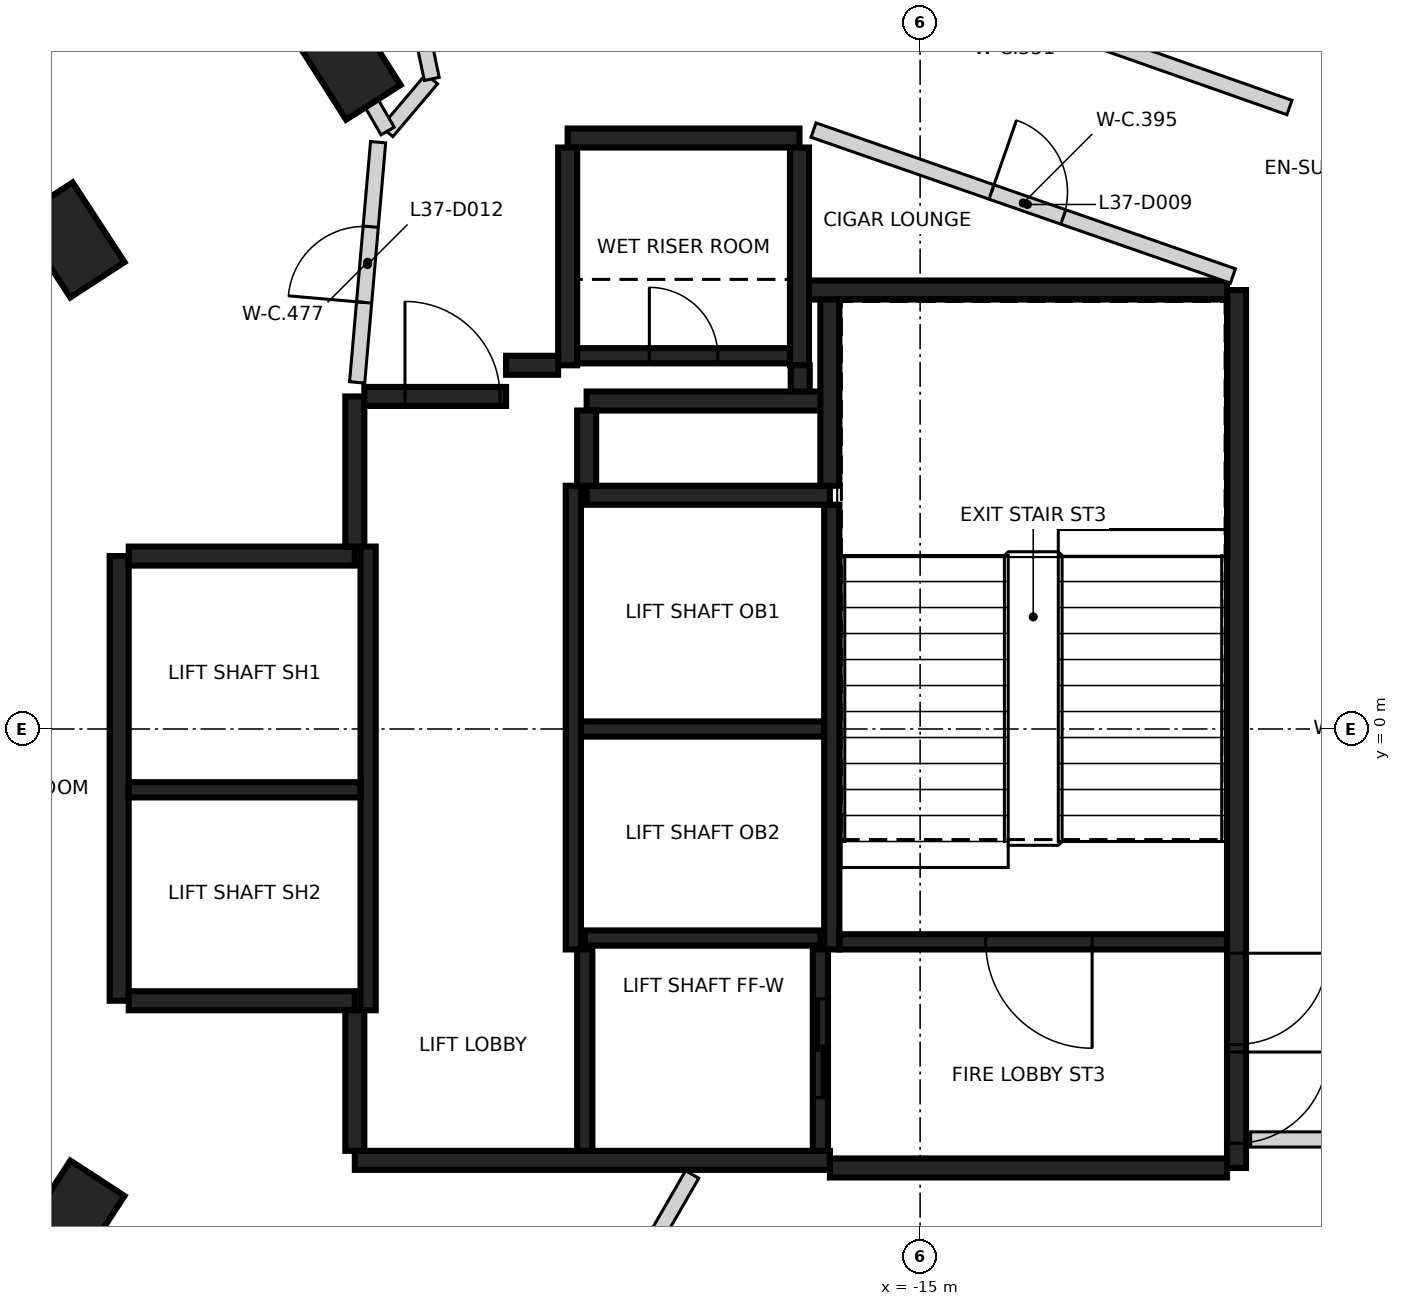
"""IFC4 building model, lengths in metres.
Left out: names, types, materials, properties, quantities, classifications, styles, units other than length and angle.
Written with IfcOpenShell. Run it as: python <this file> out.ifc"""

import sys

from ifc_helpers import new_model, si_unit, direction, frame, frame_2d, origin, origin_2d, place, context, subcontext, project, spatial, rectangle, extrude, element, fill, save


model = new_model("IFC4")
c1 = context("Model", 3, precision=1e-05, world=origin(), true_north=direction((0.0, 1.0)))
c2 = subcontext(c1, "Body", "Model", "MODEL_VIEW")
j1 = project(units=[si_unit("LENGTHUNIT", "METRE"), si_unit("PLANEANGLEUNIT", "RADIAN")], contexts=[c1])
p1 = place(None, origin())
s1 = spatial("IfcSite", under=j1, at=p1, CompositionType="ELEMENT")
p2 = place(p1, origin())
s2 = spatial("IfcBuilding", under=s1, at=p2, CompositionType="ELEMENT")
p3 = place(p2, frame((0.0, 0.0, 150.4)))
s3 = spatial("IfcBuildingStorey", under=s2, at=p3, CompositionType="ELEMENT", Elevation=150.4)
for number, where, z_axis, x_axis in (
    (1, (-22.529, 8.772, -0.4), (0.0, 0.0, 1.0), (-0.536, 0.844, 0.0)),
    (2, (-26.165, 6.434, -0.4), (0.0, 0.0, 1.0), (-0.546, 0.838, 0.0)),
    (3, (-26.165, -6.434, -0.4), (0.0, 0.0, 1.0), (0.546, 0.838, 0.0)),
):
    element("IfcColumn", number, at=place(p3, frame(where, z_axis=z_axis, x_axis=x_axis)), inside=s3, PredefinedType="COLUMN", context=c2, shape_type="SweptSolid", body=[
        extrude(rectangle(XDim=1.25, YDim=0.85, at=origin_2d()), origin(), (0.0, 0.0, 1.0), 3.6),
    ])
p4 = place(p3, frame((-10.837, 5.775, 0.0), z_axis=(0.0, 0.0, 1.0), x_axis=(0.0, -1.0, 0.0)))
e4 = element("IfcWall", 4, at=p4, inside=s3, PredefinedType="SHEAR", context=c2, shape_type="SweptSolid", body=[
    extrude(rectangle(XDim=11.55, YDim=0.25, at=frame_2d((5.775, 0.0))), origin(), (0.0, 0.0, 1.0), 3.2),
])
p5 = place(p4, frame((10.025, 0.0, 0.0)))
e5 = element("IfcOpeningElement", 5, at=p5, cuts=e4, PredefinedType="OPENING", context=c2, shape_type="SweptSolid", body=[
    extrude(rectangle(XDim=1.2, YDim=2.1, at=frame_2d((0.6, 1.05))), frame((0.0, 0.135, 0.0), z_axis=(0.0, -1.0, 0.0), x_axis=(1.0, 0.0, 0.0)), (0.0, 0.0, 1.0), 0.27),
])
p6 = place(p4, frame((8.725, 0.0, 0.0)))
e6 = element("IfcOpeningElement", 6, at=p6, cuts=e4, PredefinedType="OPENING", context=c2, shape_type="SweptSolid", body=[
    extrude(rectangle(XDim=1.2, YDim=2.1, at=frame_2d((0.6, 1.05))), frame((0.0, 0.135, 0.0), z_axis=(0.0, -1.0, 0.0), x_axis=(1.0, 0.0, 0.0)), (0.0, 0.0, 1.0), 0.27),
])
p7 = place(p3, frame((-16.187, -5.675, 0.0), z_axis=(0.0, 0.0, 1.0), x_axis=(-1.0, 0.0, 0.0)))
e7 = element("IfcWall", 7, at=p7, inside=s3, PredefinedType="SHEAR", context=c2, shape_type="SweptSolid", body=[
    extrude(rectangle(XDim=6.25, YDim=0.25, at=frame_2d((3.125, 0.0))), origin(), (0.0, 0.0, 1.0), 3.2),
])
p8 = place(p3, frame((-25.537, -3.575, 0.0), z_axis=(0.0, 0.0, 1.0), x_axis=(0.0, 1.0, 0.0)))
e8 = element("IfcWall", 8, at=p8, inside=s3, PredefinedType="SHEAR", context=c2, shape_type="SweptSolid", body=[
    extrude(rectangle(XDim=5.85, YDim=0.25, at=frame_2d((2.925, 0.0))), origin(), (0.0, 0.0, 1.0), 3.2),
])
p9 = place(p3, frame((-10.963, -5.775, 0.0), z_axis=(0.0, 0.0, 1.0), x_axis=(-1.0, 0.0, 0.0)))
e9 = element("IfcWall", 9, at=p9, inside=s3, PredefinedType="SHEAR", context=c2, shape_type="SweptSolid", body=[
    extrude(rectangle(XDim=5.225, YDim=0.25, at=frame_2d((2.612, 0.0))), origin(), (0.0, 0.0, 1.0), 3.2),
])
p10 = place(p3, frame((-16.472, 5.775, 0.0), z_axis=(0.0, 0.0, 1.0), x_axis=(1.0, 0.0, 0.0)))
e10 = element("IfcWall", 10, at=p10, inside=s3, PredefinedType="SHEAR", context=c2, shape_type="SweptSolid", body=[
    extrude(rectangle(XDim=5.51, YDim=0.25, at=frame_2d((2.755, 0.0))), origin(), (0.0, 0.0, 1.0), 3.2),
])
p11 = place(p3, frame((-19.387, 3.075, 0.0), z_axis=(0.0, 0.0, 1.0), x_axis=(1.0, 0.0, 0.0)))
e11 = element("IfcWall", 11, at=p11, inside=s3, PredefinedType="SHEAR", context=c2, shape_type="SweptSolid", body=[
    extrude(rectangle(XDim=3.2, YDim=0.25, at=frame_2d((1.6, 0.0))), origin(), (0.0, 0.0, 1.0), 3.2),
])
for number, where, z_axis, x_axis in (
    (12, (-22.437, -3.575, 0.0), (0.0, 0.0, 1.0), (-1.0, 0.0, 0.0)),
    (13, (-25.412, 2.275, 0.0), (0.0, 0.0, 1.0), (1.0, 0.0, 0.0)),
):
    element("IfcWall", number, at=place(p3, frame(where, z_axis=z_axis, x_axis=x_axis)), inside=s3, PredefinedType="SHEAR", context=c2, shape_type="SweptSolid", body=[
        extrude(rectangle(XDim=2.975, YDim=0.25, at=frame_2d((1.487, 0.0))), origin(), (0.0, 0.0, 1.0), 3.2),
    ])
p12 = place(p3, frame((-19.637, 7.775, 0.0), z_axis=(0.0, 0.0, 1.0), x_axis=(1.0, 0.0, 0.0)))
e14 = element("IfcWall", 14, at=p12, inside=s3, PredefinedType="SHEAR", context=c2, shape_type="SweptSolid", body=[
    extrude(rectangle(XDim=3.05, YDim=0.25, at=frame_2d((1.525, 0.0))), origin(), (0.0, 0.0, 1.0), 3.2),
])
for number, where, z_axis, x_axis in (
    (15, (-16.587, 7.65, 0.0), (0.0, 0.0, 1.0), (0.0, -1.0, 0.0)),
    (16, (-19.637, 4.785, 0.0), (0.0, 0.0, 1.0), (0.0, 1.0, 0.0)),
):
    element("IfcWall", number, at=place(p3, frame(where, z_axis=z_axis, x_axis=x_axis)), inside=s3, PredefinedType="SHEAR", context=c2, shape_type="SweptSolid", body=[
        extrude(rectangle(XDim=2.865, YDim=0.25, at=frame_2d((1.432, 0.0))), origin(), (0.0, 0.0, 1.0), 3.2),
    ])
p13 = place(p3, frame((-16.302, 4.315, 0.0), z_axis=(0.0, 0.0, 1.0), x_axis=(-1.0, 0.0, 0.0)))
e17 = element("IfcWall", 17, at=p13, inside=s3, PredefinedType="SHEAR", context=c2, shape_type="SweptSolid", body=[
    extrude(rectangle(XDim=3.085, YDim=0.25, at=frame_2d((1.542, 0.0))), origin(), (0.0, 0.0, 1.0), 3.2),
])
p14 = place(p3, frame((-16.187, 3.2, 0.0), z_axis=(0.0, 0.0, 1.0), x_axis=(0.0, 1.0, 0.0)))
e18 = element("IfcWall", 18, at=p14, inside=s3, PredefinedType="SHEAR", context=c2, shape_type="SweptSolid", body=[
    extrude(rectangle(XDim=2.449, YDim=0.25, at=frame_2d((1.225, 0.0))), origin(), (0.0, 0.0, 1.0), 3.2),
])
p15 = place(p3, frame((-22.437, 2.4, 0.0), z_axis=(0.0, 0.0, 1.0), x_axis=(0.0, 1.0, 0.0)))
e19 = element("IfcWall", 19, at=p15, inside=s3, PredefinedType="SHEAR", context=c2, shape_type="SweptSolid", body=[
    extrude(rectangle(XDim=1.975, YDim=0.25, at=frame_2d((0.987, 0.0))), origin(), (0.0, 0.0, 1.0), 3.2),
])
p16 = place(p3, frame((-22.437, -5.55, 0.0), z_axis=(0.0, 0.0, 1.0), x_axis=(0.0, 1.0, 0.0)))
e20 = element("IfcWall", 20, at=p16, inside=s3, PredefinedType="SHEAR", context=c2, shape_type="SweptSolid", body=[
    extrude(rectangle(XDim=1.849, YDim=0.25, at=frame_2d((0.925, 0.0))), origin(), (0.0, 0.0, 1.0), 3.2),
])
p17 = place(p3, frame((-22.312, 4.375, 0.0), z_axis=(0.0, 0.0, 1.0), x_axis=(1.0, 0.0, 0.0)))
e21 = element("IfcWall", 21, at=p17, inside=s3, PredefinedType="SHEAR", context=c2, shape_type="SweptSolid", body=[
    extrude(rectangle(XDim=1.865, YDim=0.25, at=frame_2d((0.932, 0.0))), origin(), (0.0, 0.0, 1.0), 3.2),
])
p18 = place(p17, frame((0.535, 0.0, 0.0)))
e22 = element("IfcOpeningElement", 22, at=p18, cuts=e21, PredefinedType="OPENING", context=c2, shape_type="SweptSolid", body=[
    extrude(rectangle(XDim=1.25, YDim=2.1, at=frame_2d((0.625, 1.05))), frame((0.0, 0.135, 0.0), z_axis=(0.0, -1.0, 0.0), x_axis=(1.0, 0.0, 0.0)), (0.0, 0.0, 1.0), 0.27),
])
p19 = place(p3, frame((-19.387, 4.19, 0.0), z_axis=(0.0, 0.0, 1.0), x_axis=(0.0, -1.0, 0.0)))
e23 = element("IfcWall", 23, at=p19, inside=s3, PredefinedType="SHEAR", context=c2, shape_type="SweptSolid", body=[
    extrude(rectangle(XDim=0.989, YDim=0.25, at=frame_2d((0.495, 0.0))), origin(), (0.0, 0.0, 1.0), 3.2),
])
p20 = place(p3, frame((-20.447, 4.785, 0.0), z_axis=(0.0, 0.0, 1.0), x_axis=(1.0, 0.0, 0.0)))
e24 = element("IfcWall", 24, at=p20, inside=s3, PredefinedType="SHEAR", context=c2, shape_type="SweptSolid", body=[
    extrude(rectangle(XDim=0.685, YDim=0.25, at=frame_2d((0.342, 0.0))), origin(), (0.0, 0.0, 1.0), 3.2),
])
p21 = place(p3, frame((-16.577, 4.785, 0.0), z_axis=(0.0, 0.0, 1.0), x_axis=(0.0, -1.0, 0.0)))
e25 = element("IfcWall", 25, at=p21, inside=s3, PredefinedType="SHEAR", context=c2, shape_type="SweptSolid", body=[
    extrude(rectangle(XDim=0.344, YDim=0.25, at=frame_2d((0.172, 0.0))), origin(), (0.0, 0.0, 1.0), 3.2),
])
p22 = place(p3, frame((-16.162, 2.951, 0.0), z_axis=(0.0, 0.0, 1.0), x_axis=(0.0, -1.0, 0.0)))
e26 = element("IfcWall", 26, at=p22, inside=s3, PredefinedType="SHEAR", context=c2, shape_type="SweptSolid", body=[
    extrude(rectangle(XDim=5.851, YDim=0.2, at=frame_2d((2.925, 0.0))), origin(), (0.0, 0.0, 1.0), 3.2),
])
for number, where, z_axis, x_axis in (
    (27, (-19.562, -2.9, 0.0), (0.0, 0.0, 1.0), (0.0, 1.0, 0.0)),
    (28, (-22.262, 2.4, 0.0), (0.0, 0.0, 1.0), (0.0, -1.0, 0.0)),
):
    element("IfcWall", number, at=place(p3, frame(where, z_axis=z_axis, x_axis=x_axis)), inside=s3, PredefinedType="SHEAR", context=c2, shape_type="SweptSolid", body=[
        extrude(rectangle(XDim=6.1, YDim=0.2, at=frame_2d((3.05, 0.0))), origin(), (0.0, 0.0, 1.0), 3.2),
    ])
p23 = place(p3, frame((-10.963, -2.8, 0.0), z_axis=(0.0, 0.0, 1.0), x_axis=(-1.0, 0.0, 0.0)))
e29 = element("IfcWall", 29, at=p23, inside=s3, PredefinedType="SHEAR", context=c2, shape_type="SweptSolid", body=[
    extrude(rectangle(XDim=5.098, YDim=0.2, at=frame_2d((2.549, 0.0))), origin(), (0.0, 0.0, 1.0), 3.2),
])
p24 = place(p23, frame((1.774, 0.0, 0.0)))
e30 = element("IfcOpeningElement", 30, at=p24, cuts=e29, PredefinedType="OPENING", context=c2, shape_type="SweptSolid", body=[
    extrude(rectangle(XDim=1.4, YDim=2.1, at=frame_2d((0.7, 1.05))), frame((0.0, 0.11, 0.0), z_axis=(0.0, -1.0, 0.0), x_axis=(1.0, 0.0, 0.0)), (0.0, 0.0, 1.0), 0.22),
])
p25 = place(p3, frame((-16.263, 0.0, 0.0), z_axis=(0.0, 0.0, 1.0), x_axis=(-1.0, 0.0, 0.0)))
e31 = element("IfcWall", 31, at=p25, inside=s3, PredefinedType="SHEAR", context=c2, shape_type="SweptSolid", body=[
    extrude(rectangle(XDim=3.198, YDim=0.2, at=frame_2d((1.599, 0.0))), origin(), (0.0, 0.0, 1.0), 3.2),
])
p26 = place(p3, frame((-22.363, -0.8, 0.0), z_axis=(0.0, 0.0, 1.0), x_axis=(-1.0, 0.0, 0.0)))
e32 = element("IfcWall", 32, at=p26, inside=s3, PredefinedType="SHEAR", context=c2, shape_type="SweptSolid", body=[
    extrude(rectangle(XDim=3.048, YDim=0.2, at=frame_2d((1.524, 0.0))), origin(), (0.0, 0.0, 1.0), 3.2),
])
p27 = place(p3, frame((-19.511, 4.91, 0.0), z_axis=(0.0, 0.0, 1.0), x_axis=(1.0, 0.0, 0.0)))
e33 = element("IfcWall", 33, at=p27, inside=s3, PredefinedType="SHEAR", context=c2, shape_type="SweptSolid", body=[
    extrude(rectangle(XDim=2.798, YDim=0.2, at=frame_2d((1.399, 0.0))), origin(), (0.0, 0.0, 1.0), 3.2),
])
p28 = place(p27, frame((0.949, 0.0, 0.0)))
e34 = element("IfcOpeningElement", 34, at=p28, cuts=e33, PredefinedType="OPENING", context=c2, shape_type="SweptSolid", body=[
    extrude(rectangle(XDim=0.9, YDim=2.1, at=frame_2d((0.45, 1.05))), frame((0.0, 0.11, 0.0), z_axis=(0.0, -1.0, 0.0), x_axis=(1.0, 0.0, 0.0)), (0.0, 0.0, 1.0), 0.22),
])
p29 = place(p3, frame((-19.412, -2.75, 0.0), z_axis=(0.0, 0.0, 1.0), x_axis=(1.0, 0.0, 0.0)))
e35 = element("IfcWall", 35, at=p29, inside=s3, PredefinedType="SHEAR", context=c2, shape_type="SweptSolid", body=[
    extrude(rectangle(XDim=3.1, YDim=0.2, at=frame_2d((1.55, 0.0))), origin(), (0.0, 0.0, 1.0), 3.2),
])
p30 = place(p3, frame((-16.312, -2.898, 0.0), z_axis=(0.0, 0.0, 1.0), x_axis=(0.0, -1.0, 0.0)))
e36 = element("IfcWall", 36, at=p30, inside=s3, PredefinedType="SHEAR", context=c2, shape_type="SweptSolid", body=[
    extrude(rectangle(XDim=2.651, YDim=0.2, at=frame_2d((1.325, 0.0))), origin(), (0.0, 0.0, 1.0), 3.2),
])
p31 = place(p30, frame((0.652, 0.0, 0.0)))
e37 = element("IfcOpeningElement", 37, at=p31, cuts=e36, PredefinedType="OPENING", context=c2, shape_type="SweptSolid", body=[
    extrude(rectangle(XDim=1.3, YDim=2.1, at=frame_2d((0.65, 1.05))), frame((0.0, 0.11, 0.0), z_axis=(0.0, -1.0, 0.0), x_axis=(1.0, 0.0, 0.0)), (0.0, 0.0, 1.0), 0.22),
])
p32 = place(p3, frame((-19.412, -5.549, 0.0), z_axis=(0.0, 0.0, 1.0), x_axis=(0.0, 1.0, 0.0)))
e38 = element("IfcWall", 38, at=p32, inside=s3, PredefinedType="SHEAR", context=c2, shape_type="SweptSolid", body=[
    extrude(rectangle(XDim=2.651, YDim=0.2, at=frame_2d((1.325, 0.0))), origin(), (0.0, 0.0, 1.0), 3.2),
])
p33 = place(p3, frame((-22.407, 4.56, 0.0), z_axis=(0.0, 0.0, 1.0), x_axis=(0.086898645684, 0.996217157741, 0.0)))
e39 = element("IfcWall", 39, at=p33, inside=s3, PredefinedType="PARTITIONING", context=c2, shape_type="SweptSolid", body=[
    extrude(rectangle(XDim=3.172, YDim=0.2, at=frame_2d((1.586, 0.0))), origin(), (0.0, 0.0, 1.0), 3.2),
])
p34 = place(p33, frame((1.056, 0.0, 0.0)))
e40 = element("IfcOpeningElement", 40, at=p34, cuts=e39, PredefinedType="OPENING", context=c2, shape_type="SweptSolid", body=[
    extrude(rectangle(XDim=1.0, YDim=2.1, at=frame_2d((0.5, 1.05))), frame((0.0, 0.11, 0.0), z_axis=(0.0, -1.0, 0.0), x_axis=(1.0, 0.0, 0.0)), (0.0, 0.0, 1.0), 0.22),
])
p35 = place(p3, frame((-22.013, 7.858, 0.0), z_axis=(0.0, 0.0, 1.0), x_axis=(0.646315152402, 0.763070588986, 0.0)))
e41 = element("IfcWall", 41, at=p35, inside=s3, PredefinedType="PARTITIONING", context=c2, shape_type="SweptSolid", body=[
    extrude(rectangle(XDim=0.91, YDim=0.2, at=frame_2d((0.455, 0.0))), origin(), (0.0, 0.0, 1.0), 3.2),
])
p36 = place(p3, frame((-21.605, 9.412, 0.0), z_axis=(0.0, 0.0, 1.0), x_axis=(0.204764111512, -0.978811349871, 0.0)))
e42 = element("IfcWall", 42, at=p36, inside=s3, PredefinedType="PARTITIONING", context=c2, shape_type="SweptSolid", body=[
    extrude(rectangle(XDim=0.879, YDim=0.2, at=frame_2d((0.439, 0.0))), origin(), (0.0, 0.0, 1.0), 2.3),
])
p37 = place(p3, frame((-16.402, 7.879, 0.0), z_axis=(0.0, 0.0, 1.0), x_axis=(0.94449961557, -0.328512520596, 0.0)))
e43 = element("IfcWall", 43, at=p37, inside=s3, PredefinedType="PARTITIONING", context=c2, shape_type="SweptSolid", body=[
    extrude(rectangle(XDim=5.842, YDim=0.2, at=frame_2d((2.921, 0.0))), origin(), (0.0, 0.0, 1.0), 3.2),
])
p38 = place(p37, frame((2.479, 0.0, 0.0)))
e44 = element("IfcOpeningElement", 44, at=p38, cuts=e43, PredefinedType="OPENING", context=c2, shape_type="SweptSolid", body=[
    extrude(rectangle(XDim=1.0, YDim=2.1, at=frame_2d((0.5, 1.05))), frame((0.0, 0.11, 0.0), z_axis=(0.0, -1.0, 0.0), x_axis=(1.0, 0.0, 0.0)), (0.0, 0.0, 1.0), 0.22),
])
p39 = place(p3, frame((-16.026, 10.246, 0.0), z_axis=(0.0, 0.0, 1.0), x_axis=(0.943337348352, -0.331835271187, 0.0)))
e45 = element("IfcWall", 45, at=p39, inside=s3, PredefinedType="PARTITIONING", context=c2, shape_type="SweptSolid", body=[
    extrude(rectangle(XDim=6.238, YDim=0.2, at=frame_2d((3.119, 0.0))), origin(), (0.0, 0.0, 1.0), 3.2),
])
p40 = place(p39, frame((0.2, 0.0, 0.0)))
e46 = element("IfcOpeningElement", 46, at=p40, cuts=e45, PredefinedType="OPENING", context=c2, shape_type="SweptSolid", body=[
    extrude(rectangle(XDim=0.95, YDim=2.1, at=frame_2d((0.475, 1.05))), frame((0.0, 0.11, 0.0), z_axis=(0.0, -1.0, 0.0), x_axis=(1.0, 0.0, 0.0)), (0.0, 0.0, 1.0), 0.22),
])
p41 = place(p3, frame((-10.652, -5.4, 0.0), z_axis=(0.0, 0.0, 1.0), x_axis=(1.0, 0.0, 0.0)))
e47 = element("IfcWall", 47, at=p41, inside=s3, PredefinedType="PARTITIONING", context=c2, shape_type="SweptSolid", body=[
    extrude(rectangle(XDim=1.39, YDim=0.2, at=frame_2d((0.695, 0.0))), origin(), (0.0, 0.0, 1.0), 3.2),
])
p42 = place(p3, frame((-23.758, 10.9, 0.0), z_axis=(0.0, 0.0, 1.0), x_axis=(0.500112665219, -0.865960346718, 0.0)))
e48 = element("IfcWall", 48, at=p42, inside=s3, PredefinedType="PARTITIONING", context=c2, shape_type="SweptSolid", body=[
    extrude(rectangle(XDim=3.502, YDim=0.2, at=frame_2d((1.751, 0.0))), origin(), (0.0, 0.0, 1.0), 3.2),
])
p43 = place(p3, frame((-21.664, -12.21, 0.0), z_axis=(0.0, 0.0, 1.0), x_axis=(0.499938621367, 0.866060837855, 0.0)))
e49 = element("IfcWall", 49, at=p43, inside=s3, PredefinedType="PARTITIONING", context=c2, shape_type="SweptSolid", body=[
    extrude(rectangle(XDim=7.333, YDim=0.2, at=frame_2d((3.666, 0.0))), origin(), (0.0, 0.0, 1.0), 2.3),
])
p44 = place(p3, frame((-10.071, 19.158, 0.0), z_axis=(0.0, 0.0, 1.0), x_axis=(0.499905140254, -0.866080164158, 0.0)))
e50 = element("IfcWall", 50, at=p44, inside=s3, PredefinedType="PARTITIONING", context=c2, shape_type="SweptSolid", body=[
    extrude(rectangle(XDim=13.227, YDim=0.2, at=frame_2d((6.613, 0.0))), origin(), (0.0, 0.0, 1.0), 2.3),
])
p45 = place(p31, origin())
e51 = element("IfcDoor", 51, at=p45, inside=s3, OperationType="SLIDING_TO_LEFT", PredefinedType="DOOR", context=c2, shape_type="SweptSolid", body=[
    extrude(rectangle(XDim=1.3, YDim=2.1, at=frame_2d((0.65, 1.05))), frame((0.0, 0.025, 0.0), z_axis=(0.0, -1.0, 0.0), x_axis=(1.0, 0.0, 0.0)), (0.0, 0.0, 1.0), 0.05),
])
fill(e37, e51)
p46 = place(p18, origin())
e52 = element("IfcDoor", 52, at=p46, inside=s3, OperationType="SINGLE_SWING_LEFT", PredefinedType="DOOR", context=c2, shape_type="SweptSolid", body=[
    extrude(rectangle(XDim=1.25, YDim=2.1, at=frame_2d((0.625, 1.05))), frame((0.0, 0.025, 0.0), z_axis=(0.0, -1.0, 0.0), x_axis=(1.0, 0.0, 0.0)), (0.0, 0.0, 1.0), 0.05),
])
fill(e22, e52)
p47 = place(p5, origin())
e53 = element("IfcDoor", 53, at=p47, inside=s3, OperationType="SINGLE_SWING_LEFT", PredefinedType="DOOR", context=c2, shape_type="SweptSolid", body=[
    extrude(rectangle(XDim=1.2, YDim=2.1, at=frame_2d((0.6, 1.05))), frame((0.0, 0.025, 0.0), z_axis=(0.0, -1.0, 0.0), x_axis=(1.0, 0.0, 0.0)), (0.0, 0.0, 1.0), 0.05),
])
fill(e5, e53)
p48 = place(p6, origin())
e54 = element("IfcDoor", 54, at=p48, inside=s3, OperationType="SINGLE_SWING_RIGHT", PredefinedType="DOOR", context=c2, shape_type="SweptSolid", body=[
    extrude(rectangle(XDim=1.2, YDim=2.1, at=frame_2d((0.6, 1.05))), frame((0.0, 0.025, 0.0), z_axis=(0.0, -1.0, 0.0), x_axis=(1.0, 0.0, 0.0)), (0.0, 0.0, 1.0), 0.05),
])
fill(e6, e54)
p49 = place(p24, origin())
e55 = element("IfcDoor", 55, at=p49, inside=s3, OperationType="SINGLE_SWING_LEFT", PredefinedType="DOOR", context=c2, shape_type="SweptSolid", body=[
    extrude(rectangle(XDim=1.4, YDim=2.1, at=frame_2d((0.7, 1.05))), frame((0.0, 0.025, 0.0), z_axis=(0.0, -1.0, 0.0), x_axis=(1.0, 0.0, 0.0)), (0.0, 0.0, 1.0), 0.05),
])
fill(e30, e55)
p50 = place(p28, origin())
e56 = element("IfcDoor", 56, at=p50, inside=s3, OperationType="SINGLE_SWING_RIGHT", PredefinedType="DOOR", context=c2, shape_type="SweptSolid", body=[
    extrude(rectangle(XDim=0.9, YDim=2.1, at=frame_2d((0.45, 1.05))), frame((0.0, 0.025, 0.0), z_axis=(0.0, -1.0, 0.0), x_axis=(1.0, 0.0, 0.0)), (0.0, 0.0, 1.0), 0.05),
])
fill(e34, e56)
p51 = place(p38, frame((1.0, 0.0, 0.0), z_axis=(0.0, 0.0, 1.0), x_axis=(-1.0, 0.0, 0.0)))
e57 = element("IfcDoor", 57, at=p51, inside=s3, OperationType="SINGLE_SWING_LEFT", PredefinedType="DOOR", context=c2, shape_type="SweptSolid", body=[
    extrude(rectangle(XDim=1.0, YDim=2.1, at=frame_2d((0.5, 1.05))), frame((0.0, 0.025, 0.0), z_axis=(0.0, -1.0, 0.0), x_axis=(1.0, 0.0, 0.0)), (0.0, 0.0, 1.0), 0.05),
])
fill(e44, e57)
p52 = place(p34, origin())
e58 = element("IfcDoor", 58, at=p52, inside=s3, OperationType="SINGLE_SWING_LEFT", PredefinedType="DOOR", context=c2, shape_type="SweptSolid", body=[
    extrude(rectangle(XDim=1.0, YDim=2.1, at=frame_2d((0.5, 1.05))), frame((0.0, 0.025, 0.0), z_axis=(0.0, -1.0, 0.0), x_axis=(1.0, 0.0, 0.0)), (0.0, 0.0, 1.0), 0.05),
])
fill(e40, e58)
save(model, sys.argv[1])
